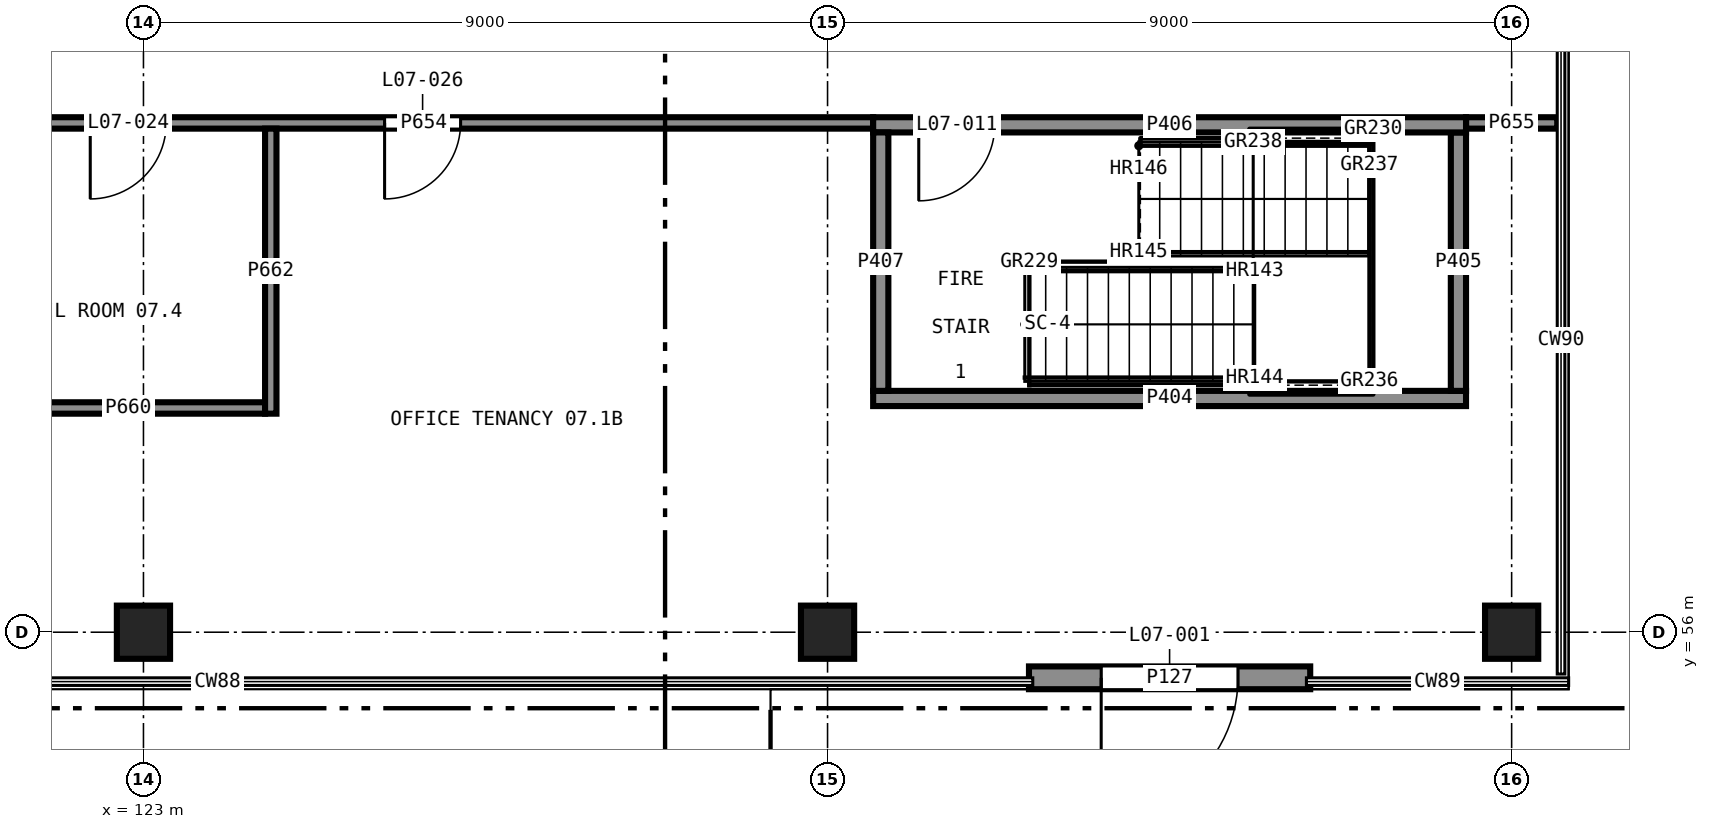
"""IFC4 building model, lengths in metres.
Left out: names, types, materials, properties, quantities, classifications, styles, units other than length and angle.
Written with IfcOpenShell. Run it as: python <this file> out.ifc"""

import sys

from ifc_helpers import new_model, si_unit, direction, frame, frame_2d, origin, origin_2d, place, context, subcontext, project, spatial, rectangle, extrude, element, fill, save


model = new_model("IFC4")
c1 = context("Model", 3, precision=1e-05, world=origin(), true_north=direction((0.0, 1.0)))
c2 = subcontext(c1, "Body", "Model", "MODEL_VIEW")
j1 = project(units=[si_unit("LENGTHUNIT", "METRE"), si_unit("PLANEANGLEUNIT", "RADIAN")], contexts=[c1])
p1 = place(None, origin())
s1 = spatial("IfcSite", under=j1, at=p1, CompositionType="ELEMENT")
p2 = place(p1, origin())
s2 = spatial("IfcBuilding", under=s1, at=p2, CompositionType="ELEMENT")
p3 = place(p2, frame((0.0, 0.0, 29.5)))
s3 = spatial("IfcBuildingStorey", under=s2, at=p3, CompositionType="ELEMENT", Elevation=29.5)
for number, where, z_axis, x_axis in (
    (1, (123.0, 56.0, 0.0), (0.0, 0.0, 1.0), (1.0, 0.0, 0.0)),
    (2, (132.0, 56.0, 0.0), (0.0, 0.0, 1.0), (1.0, 0.0, 0.0)),
    (3, (141.0, 56.0, 0.0), (0.0, 0.0, 1.0), (1.0, 0.0, 0.0)),
):
    element("IfcColumn", number, at=place(p3, frame(where, z_axis=z_axis, x_axis=x_axis)), inside=s3, PredefinedType="COLUMN", context=c2, shape_type="SweptSolid", body=[
        extrude(rectangle(XDim=0.7, YDim=0.7, at=origin_2d()), origin(), (0.0, 0.0, 1.0), 4.0),
    ])
p4 = place(p3, frame((134.65, 55.4, 0.0), z_axis=(0.0, 0.0, 1.0), x_axis=(1.0, 0.0, 0.0)))
e4 = element("IfcWall", 4, at=p4, inside=s3, PredefinedType="SOLIDWALL", context=c2, shape_type="SweptSolid", body=[
    extrude(rectangle(XDim=3.7, YDim=0.3, at=frame_2d((1.85, 0.0))), origin(), (0.0, 0.0, 1.0), 3.75),
])
p5 = place(p4, frame((0.95, 0.0, 0.0)))
e5 = element("IfcOpeningElement", 5, at=p5, cuts=e4, PredefinedType="OPENING", context=c2, shape_type="SweptSolid", body=[
    extrude(rectangle(XDim=1.8, YDim=2.4, at=frame_2d((0.9, 1.2))), frame((0.0, 0.16, 0.0), z_axis=(0.0, -1.0, 0.0), x_axis=(1.0, 0.0, 0.0)), (0.0, 0.0, 1.0), 0.32),
])
p6 = place(p3, frame((132.6, 59.075, 0.0), z_axis=(0.0, 0.0, 1.0), x_axis=(1.0, 0.0, 0.0)))
e6 = element("IfcWall", 6, at=p6, inside=s3, PredefinedType="SHEAR", context=c2, shape_type="SweptSolid", body=[
    extrude(rectangle(XDim=7.8, YDim=0.2, at=frame_2d((3.9, 0.0))), origin(), (0.0, 0.0, 1.0), 3.75),
])
p7 = place(p3, frame((140.3, 59.175, 0.0), z_axis=(0.0, 0.0, 1.0), x_axis=(0.0, 1.0, 0.0)))
e7 = element("IfcWall", 7, at=p7, inside=s3, PredefinedType="SHEAR", context=c2, shape_type="SweptSolid", body=[
    extrude(rectangle(XDim=3.4, YDim=0.2, at=frame_2d((1.7, 0.0))), origin(), (0.0, 0.0, 1.0), 3.75),
])
p8 = place(p3, frame((140.4, 62.675, 0.0), z_axis=(0.0, 0.0, 1.0), x_axis=(-1.0, 0.0, 0.0)))
e8 = element("IfcWall", 8, at=p8, inside=s3, PredefinedType="SHEAR", context=c2, shape_type="SweptSolid", body=[
    extrude(rectangle(XDim=7.8, YDim=0.2, at=frame_2d((3.9, 0.0))), origin(), (0.0, 0.0, 1.0), 3.75),
])
p9 = place(p8, frame((6.2, 0.0, 0.0)))
e9 = element("IfcOpeningElement", 9, at=p9, cuts=e8, PredefinedType="OPENING", context=c2, shape_type="SweptSolid", body=[
    extrude(rectangle(XDim=1.0, YDim=2.1, at=frame_2d((0.5, 1.05))), frame((0.0, 0.11, 0.0), z_axis=(0.0, -1.0, 0.0), x_axis=(1.0, 0.0, 0.0)), (0.0, 0.0, 1.0), 0.22),
])
p10 = place(p3, frame((132.7, 62.575, 0.0), z_axis=(0.0, 0.0, 1.0), x_axis=(0.0, -1.0, 0.0)))
e10 = element("IfcWall", 10, at=p10, inside=s3, PredefinedType="SHEAR", context=c2, shape_type="SweptSolid", body=[
    extrude(rectangle(XDim=3.4, YDim=0.2, at=frame_2d((1.7, 0.0))), origin(), (0.0, 0.0, 1.0), 3.75),
])
p11 = place(p3, frame((132.6, 62.7, 0.0), z_axis=(0.0, 0.0, 1.0), x_axis=(-1.0, 0.0, 0.0)))
e11 = element("IfcWall", 11, at=p11, inside=s3, PredefinedType="PARTITIONING", context=c2, shape_type="SweptSolid", body=[
    extrude(rectangle(XDim=11.825, YDim=0.15, at=frame_2d((5.913, 0.0))), origin(), (0.0, 0.0, 1.0), 3.75),
])
p12 = place(p11, frame((9.3, 0.0, 0.0)))
e12 = element("IfcOpeningElement", 12, at=p12, cuts=e11, PredefinedType="OPENING", context=c2, shape_type="SweptSolid", body=[
    extrude(rectangle(XDim=1.0, YDim=2.1, at=frame_2d((0.5, 1.05))), frame((0.0, 0.085, 0.0), z_axis=(0.0, -1.0, 0.0), x_axis=(1.0, 0.0, 0.0)), (0.0, 0.0, 1.0), 0.17),
])
p13 = place(p11, frame((5.427, 0.0, 0.0)))
e13 = element("IfcOpeningElement", 13, at=p13, cuts=e11, PredefinedType="OPENING", context=c2, shape_type="SweptSolid", body=[
    extrude(rectangle(XDim=1.0, YDim=2.1, at=frame_2d((0.5, 1.05))), frame((0.0, 0.085, 0.0), z_axis=(0.0, -1.0, 0.0), x_axis=(1.0, 0.0, 0.0)), (0.0, 0.0, 1.0), 0.17),
])
p14 = place(p3, frame((141.6, 62.7, 0.0), z_axis=(0.0, 0.0, 1.0), x_axis=(-1.0, 0.0, 0.0)))
e14 = element("IfcWall", 14, at=p14, inside=s3, PredefinedType="PARTITIONING", context=c2, shape_type="SweptSolid", body=[
    extrude(rectangle(XDim=1.2, YDim=0.15, at=frame_2d((0.6, 0.0))), origin(), (0.0, 0.0, 1.0), 3.75),
])
p15 = place(p3, frame((121.0, 58.95, 0.0), z_axis=(0.0, 0.0, 1.0), x_axis=(1.0, 0.0, 0.0)))
e15 = element("IfcWall", 15, at=p15, inside=s3, PredefinedType="PARTITIONING", context=c2, shape_type="SweptSolid", body=[
    extrude(rectangle(XDim=3.6, YDim=0.15, at=frame_2d((1.8, 0.0))), origin(), (0.0, 0.0, 1.0), 3.75),
])
p16 = place(p3, frame((124.675, 62.625, 0.0), z_axis=(0.0, 0.0, 1.0), x_axis=(0.0, -1.0, 0.0)))
e16 = element("IfcWall", 16, at=p16, inside=s3, PredefinedType="PARTITIONING", context=c2, shape_type="SweptSolid", body=[
    extrude(rectangle(XDim=3.75, YDim=0.15, at=frame_2d((1.875, 0.0))), origin(), (0.0, 0.0, 1.0), 3.75),
])
p17 = place(p5, frame((1.8, 0.0, 0.0), z_axis=(0.0, 0.0, 1.0), x_axis=(-1.0, 0.0, 0.0)))
e17 = element("IfcDoor", 17, at=p17, inside=s3, OperationType="DOUBLE_DOOR_SINGLE_SWING", PredefinedType="DOOR", context=c2, shape_type="SweptSolid", body=[
    extrude(rectangle(XDim=1.8, YDim=2.4, at=frame_2d((0.9, 1.2))), frame((0.0, 0.025, 0.0), z_axis=(0.0, -1.0, 0.0), x_axis=(1.0, 0.0, 0.0)), (0.0, 0.0, 1.0), 0.05),
])
fill(e5, e17)
p18 = place(p9, origin())
e18 = element("IfcDoor", 18, at=p18, inside=s3, OperationType="SINGLE_SWING_LEFT", PredefinedType="DOOR", context=c2, shape_type="SweptSolid", body=[
    extrude(rectangle(XDim=1.0, YDim=2.1, at=frame_2d((0.5, 1.05))), frame((0.0, 0.025, 0.0), z_axis=(0.0, -1.0, 0.0), x_axis=(1.0, 0.0, 0.0)), (0.0, 0.0, 1.0), 0.05),
])
fill(e9, e18)
p19 = place(p12, origin())
e19 = element("IfcDoor", 19, at=p19, inside=s3, OperationType="SINGLE_SWING_LEFT", PredefinedType="DOOR", context=c2, shape_type="SweptSolid", body=[
    extrude(rectangle(XDim=1.0, YDim=2.1, at=frame_2d((0.5, 1.05))), frame((0.0, 0.025, 0.0), z_axis=(0.0, -1.0, 0.0), x_axis=(1.0, 0.0, 0.0)), (0.0, 0.0, 1.0), 0.05),
])
fill(e12, e19)
p20 = place(p13, origin())
e20 = element("IfcDoor", 20, at=p20, inside=s3, OperationType="SINGLE_SWING_LEFT", PredefinedType="DOOR", context=c2, shape_type="SweptSolid", body=[
    extrude(rectangle(XDim=1.0, YDim=2.1, at=frame_2d((0.5, 1.05))), frame((0.0, 0.025, 0.0), z_axis=(0.0, -1.0, 0.0), x_axis=(1.0, 0.0, 0.0)), (0.0, 0.0, 1.0), 0.05),
])
fill(e13, e20)
save(model, sys.argv[1])
